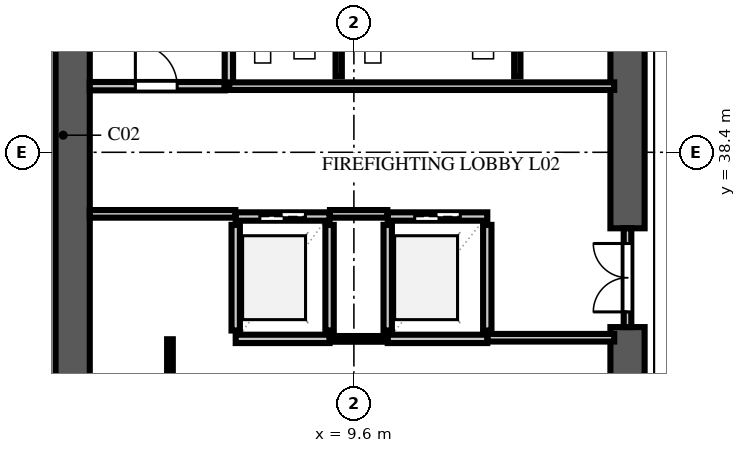
"""IFC4 building model, lengths in metres.
Left out: names, types, materials, properties, quantities, classifications, styles, units other than length and angle.
Written with IfcOpenShell. Run it as: python <this file> out.ifc"""

import sys

from ifc_helpers import new_model, si_unit, direction, frame, frame_2d, origin, place, context, subcontext, project, spatial, rectangle, extrude, element, fill, save


model = new_model("IFC4")
c1 = context("Model", 3, precision=1e-05, world=origin(), true_north=direction((0.0, 1.0)))
c2 = subcontext(c1, "Body", "Model", "MODEL_VIEW")
j1 = project(units=[si_unit("LENGTHUNIT", "METRE"), si_unit("PLANEANGLEUNIT", "RADIAN")], contexts=[c1])
p1 = place(None, origin())
s1 = spatial("IfcSite", under=j1, at=p1, CompositionType="ELEMENT")
p2 = place(p1, origin())
s2 = spatial("IfcBuilding", under=s1, at=p2, CompositionType="ELEMENT")
p3 = place(p2, frame((0.0, 0.0, 10.4)))
s3 = spatial("IfcBuildingStorey", under=s2, at=p3, CompositionType="ELEMENT", Elevation=10.4)
p4 = place(p3, frame((2.2, 9.15, 0.0), z_axis=(0.0, 0.0, 1.0), x_axis=(0.0, 1.0, 0.0)))
e1 = element("IfcWall", 1, at=p4, inside=s3, PredefinedType="SHEAR", context=c2, shape_type="SweptSolid", body=[
    extrude(rectangle(XDim=39.3, YDim=0.9, at=frame_2d((19.65, 0.0))), origin(), (0.0, 0.0, 1.0), 4.26),
])
p5 = place(p3, frame((16.8, 26.0, 0.0), z_axis=(0.0, 0.0, 1.0), x_axis=(0.0, 1.0, 0.0)))
e2 = element("IfcWall", 2, at=p5, inside=s3, PredefinedType="SHEAR", context=c2, shape_type="SweptSolid", body=[
    extrude(rectangle(XDim=7.8, YDim=0.9, at=frame_2d((3.9, 0.0))), origin(), (0.0, 0.0, 1.0), 4.26),
])
p6 = place(p3, frame((16.8, 36.4, 0.0), z_axis=(0.0, 0.0, 1.0), x_axis=(0.0, 1.0, 0.0)))
e3 = element("IfcWall", 3, at=p6, inside=s3, PredefinedType="SHEAR", context=c2, shape_type="SweptSolid", body=[
    extrude(rectangle(XDim=11.15, YDim=0.9, at=frame_2d((5.575, 0.0))), origin(), (0.0, 0.0, 1.0), 4.26),
])
p7 = place(p6, frame((9.2, 0.0, 0.0)))
e4 = element("IfcOpeningElement", 4, at=p7, cuts=e3, PredefinedType="OPENING", context=c2, shape_type="SweptSolid", body=[
    extrude(rectangle(XDim=0.95, YDim=2.15, at=frame_2d((0.475, 1.075))), frame((0.0, 0.462, 0.0), z_axis=(0.0, -1.0, 0.0), x_axis=(1.0, 0.0, 0.0)), (0.0, 0.0, 1.0), 0.924),
])
p8 = place(p3, frame((2.65, 40.14, 0.0), z_axis=(0.0, 0.0, 1.0), x_axis=(1.0, 0.0, 0.0)))
e5 = element("IfcWall", 5, at=p8, inside=s3, PredefinedType="SOLIDWALL", context=c2, shape_type="SweptSolid", body=[
    extrude(rectangle(XDim=3.55, YDim=0.22, at=frame_2d((1.775, 0.0))), origin(), (0.0, 0.0, 1.0), 4.26),
])
p9 = place(p8, frame((1.2, 0.0, 0.0)))
e6 = element("IfcOpeningElement", 6, at=p9, cuts=e5, PredefinedType="OPENING", context=c2, shape_type="SweptSolid", body=[
    extrude(rectangle(XDim=1.1, YDim=2.2, at=frame_2d((0.55, 1.1))), frame((0.0, 0.122, 0.0), z_axis=(0.0, -1.0, 0.0), x_axis=(1.0, 0.0, 0.0)), (0.0, 0.0, 1.0), 0.244),
])
p10 = place(p3, frame((6.31, 40.14, 0.0), z_axis=(0.0, 0.0, 1.0), x_axis=(0.0, 1.0, 0.0)))
e7 = element("IfcWall", 7, at=p10, inside=s3, PredefinedType="SOLIDWALL", context=c2, shape_type="SweptSolid", body=[
    extrude(rectangle(XDim=7.81, YDim=0.22, at=frame_2d((3.905, 0.0))), origin(), (0.0, 0.0, 1.0), 4.26),
])
for number, where, z_axis, x_axis in (
    (8, (6.49, 33.71, 0.0), (0.0, 0.0, 1.0), (0.0, 1.0, 0.0)),
    (9, (8.96, 33.71, 0.0), (0.0, 0.0, 1.0), (0.0, 1.0, 0.0)),
):
    element("IfcWall", number, at=place(p3, frame(where, z_axis=z_axis, x_axis=x_axis)), inside=s3, PredefinedType="SOLIDWALL", context=c2, shape_type="SweptSolid", body=[
        extrude(rectangle(XDim=2.78, YDim=0.22, at=frame_2d((1.39, 0.0))), origin(), (0.0, 0.0, 1.0), 4.26),
    ])
p11 = place(p3, frame((6.49, 33.49, 0.0), z_axis=(0.0, 0.0, 1.0), x_axis=(1.0, 0.0, 0.0)))
e10 = element("IfcWall", 10, at=p11, inside=s3, PredefinedType="SOLIDWALL", context=c2, shape_type="SweptSolid", body=[
    extrude(rectangle(XDim=2.47, YDim=0.22, at=frame_2d((1.235, 0.0))), origin(), (0.0, 0.0, 1.0), 4.26),
])
p12 = place(p3, frame((6.49, 36.71, 0.0), z_axis=(0.0, 0.0, 1.0), x_axis=(1.0, 0.0, 0.0)))
e11 = element("IfcWall", 11, at=p12, inside=s3, PredefinedType="SOLIDWALL", context=c2, shape_type="SweptSolid", body=[
    extrude(rectangle(XDim=2.47, YDim=0.22, at=frame_2d((1.235, 0.0))), origin(), (0.0, 0.0, 1.0), 4.26),
])
p13 = place(p12, frame((0.635, 0.0, 0.0)))
e12 = element("IfcOpeningElement", 12, at=p13, cuts=e11, PredefinedType="OPENING", context=c2, shape_type="SweptSolid", body=[
    extrude(rectangle(XDim=1.2, YDim=2.2, at=frame_2d((0.6, 1.1))), frame((0.0, 0.122, 0.0), z_axis=(0.0, -1.0, 0.0), x_axis=(1.0, 0.0, 0.0)), (0.0, 0.0, 1.0), 0.244),
])
for number, where, z_axis, x_axis in (
    (13, (10.49, 33.71, 0.0), (0.0, 0.0, 1.0), (0.0, 1.0, 0.0)),
    (14, (13.11, 33.71, 0.0), (0.0, 0.0, 1.0), (0.0, 1.0, 0.0)),
):
    element("IfcWall", number, at=place(p3, frame(where, z_axis=z_axis, x_axis=x_axis)), inside=s3, PredefinedType="SOLIDWALL", context=c2, shape_type="SweptSolid", body=[
        extrude(rectangle(XDim=2.78, YDim=0.22, at=frame_2d((1.39, 0.0))), origin(), (0.0, 0.0, 1.0), 4.26),
    ])
p14 = place(p3, frame((10.49, 33.49, 0.0), z_axis=(0.0, 0.0, 1.0), x_axis=(1.0, 0.0, 0.0)))
e15 = element("IfcWall", 15, at=p14, inside=s3, PredefinedType="SOLIDWALL", context=c2, shape_type="SweptSolid", body=[
    extrude(rectangle(XDim=2.62, YDim=0.22, at=frame_2d((1.31, 0.0))), origin(), (0.0, 0.0, 1.0), 4.26),
])
p15 = place(p3, frame((10.49, 36.71, 0.0), z_axis=(0.0, 0.0, 1.0), x_axis=(1.0, 0.0, 0.0)))
e16 = element("IfcWall", 16, at=p15, inside=s3, PredefinedType="SOLIDWALL", context=c2, shape_type="SweptSolid", body=[
    extrude(rectangle(XDim=2.62, YDim=0.22, at=frame_2d((1.31, 0.0))), origin(), (0.0, 0.0, 1.0), 4.26),
])
p16 = place(p15, frame((0.71, 0.0, 0.0)))
e17 = element("IfcOpeningElement", 17, at=p16, cuts=e16, PredefinedType="OPENING", context=c2, shape_type="SweptSolid", body=[
    extrude(rectangle(XDim=1.2, YDim=2.2, at=frame_2d((0.6, 1.1))), frame((0.0, 0.122, 0.0), z_axis=(0.0, -1.0, 0.0), x_axis=(1.0, 0.0, 0.0)), (0.0, 0.0, 1.0), 0.244),
])
p17 = place(p3, frame((2.65, 36.78, 0.0), z_axis=(0.0, 0.0, 1.0), x_axis=(1.0, 0.0, 0.0)))
e18 = element("IfcWall", 18, at=p17, inside=s3, PredefinedType="SOLIDWALL", context=c2, shape_type="SweptSolid", body=[
    extrude(rectangle(XDim=3.83, YDim=0.2, at=frame_2d((1.915, 0.0))), origin(), (0.0, 0.0, 1.0), 4.26),
])
p18 = place(p3, frame((8.97, 36.78, 0.0), z_axis=(0.0, 0.0, 1.0), x_axis=(1.0, 0.0, 0.0)))
e19 = element("IfcWall", 19, at=p18, inside=s3, PredefinedType="SOLIDWALL", context=c2, shape_type="SweptSolid", body=[
    extrude(rectangle(XDim=1.51, YDim=0.2, at=frame_2d((0.755, 0.0))), origin(), (0.0, 0.0, 1.0), 4.26),
])
p19 = place(p3, frame((13.12, 33.52, 0.0), z_axis=(0.0, 0.0, 1.0), x_axis=(1.0, 0.0, 0.0)))
e20 = element("IfcWall", 20, at=p19, inside=s3, PredefinedType="SOLIDWALL", context=c2, shape_type="SweptSolid", body=[
    extrude(rectangle(XDim=3.33, YDim=0.2, at=frame_2d((1.665, 0.0))), origin(), (0.0, 0.0, 1.0), 4.26),
])
p20 = place(p3, frame((6.32, 40.14, 0.0), z_axis=(0.0, 0.0, 1.0), x_axis=(1.0, 0.0, 0.0)))
e21 = element("IfcWall", 21, at=p20, inside=s3, PredefinedType="SOLIDWALL", context=c2, shape_type="SweptSolid", body=[
    extrude(rectangle(XDim=10.13, YDim=0.2, at=frame_2d((5.065, 0.0))), origin(), (0.0, 0.0, 1.0), 4.26),
])
p21 = place(p3, frame((16.8, 33.8, 0.0), z_axis=(0.0, 0.0, 1.0), x_axis=(0.0, 1.0, 0.0)))
e22 = element("IfcWall", 22, at=p21, inside=s3, PredefinedType="SOLIDWALL", context=c2, shape_type="SweptSolid", body=[
    extrude(rectangle(XDim=2.6, YDim=0.2, at=frame_2d((1.3, 0.0))), origin(), (0.0, 0.0, 1.0), 4.26),
])
p22 = place(p21, frame((0.4, 0.0, 0.0)))
e23 = element("IfcOpeningElement", 23, at=p22, cuts=e22, PredefinedType="OPENING", context=c2, shape_type="SweptSolid", body=[
    extrude(rectangle(XDim=1.8, YDim=2.2, at=frame_2d((0.9, 1.1))), frame((0.0, 0.112, 0.0), z_axis=(0.0, -1.0, 0.0), x_axis=(1.0, 0.0, 0.0)), (0.0, 0.0, 1.0), 0.224),
])
p23 = place(p3, frame((8.965, 33.49, 0.0), z_axis=(0.0, 0.0, 1.0), x_axis=(1.0, 0.0, 0.0)))
e24 = element("IfcWall", 24, at=p23, inside=s3, PredefinedType="PARTITIONING", context=c2, shape_type="SweptSolid", body=[
    extrude(rectangle(XDim=1.52, YDim=0.15, at=frame_2d((0.76, 0.0))), origin(), (0.0, 0.0, 1.0), 4.26),
])
p24 = place(p3, frame((4.76, 30.55, 0.0), z_axis=(0.0, 0.0, 1.0), x_axis=(0.0, 1.0, 0.0)))
e25 = element("IfcWall", 25, at=p24, inside=s3, PredefinedType="PARTITIONING", context=c2, shape_type="SweptSolid", body=[
    extrude(rectangle(XDim=2.93, YDim=0.15, at=frame_2d((1.465, 0.0))), origin(), (0.0, 0.0, 1.0), 4.26),
])
p25 = place(p24, frame((0.6, 0.0, 0.0)))
e26 = element("IfcOpeningElement", 26, at=p25, cuts=e25, PredefinedType="OPENING", context=c2, shape_type="SweptSolid", body=[
    extrude(rectangle(XDim=0.85, YDim=2.1, at=frame_2d((0.425, 1.05))), frame((0.0, 0.087, 0.0), z_axis=(0.0, -1.0, 0.0), x_axis=(1.0, 0.0, 0.0)), (0.0, 0.0, 1.0), 0.174),
])
for number, where, z_axis, x_axis in (
    (27, (9.2, 40.4, 0.0), (0.0, 0.0, 1.0), (0.0, 1.0, 0.0)),
    (28, (13.9, 40.4, 0.0), (0.0, 0.0, 1.0), (0.0, 1.0, 0.0)),
):
    element("IfcWall", number, at=place(p3, frame(where, z_axis=z_axis, x_axis=x_axis)), inside=s3, PredefinedType="PLUMBINGWALL", context=c2, shape_type="SweptSolid", body=[
        extrude(rectangle(XDim=4.92, YDim=0.165, at=frame_2d((2.46, 0.0))), origin(), (0.0, 0.0, 1.0), 4.26),
    ])
p26 = place(p9, origin())
e29 = element("IfcDoor", 29, at=p26, inside=s3, OperationType="SINGLE_SWING_LEFT", PredefinedType="DOOR", context=c2, shape_type="SweptSolid", body=[
    extrude(rectangle(XDim=1.1, YDim=2.2, at=frame_2d((0.55, 1.1))), frame((0.0, 0.025, 0.0), z_axis=(0.0, -1.0, 0.0), x_axis=(1.0, 0.0, 0.0)), (0.0, 0.0, 1.0), 0.05),
])
fill(e6, e29)
p27 = place(p13, origin())
e30 = element("IfcDoor", 30, at=p27, inside=s3, OperationType="DOUBLE_DOOR_SLIDING", PredefinedType="DOOR", context=c2, shape_type="SweptSolid", body=[
    extrude(rectangle(XDim=1.2, YDim=2.2, at=frame_2d((0.6, 1.1))), frame((0.0, 0.025, 0.0), z_axis=(0.0, -1.0, 0.0), x_axis=(1.0, 0.0, 0.0)), (0.0, 0.0, 1.0), 0.05),
])
fill(e12, e30)
p28 = place(p16, origin())
e31 = element("IfcDoor", 31, at=p28, inside=s3, OperationType="DOUBLE_DOOR_SLIDING", PredefinedType="DOOR", context=c2, shape_type="SweptSolid", body=[
    extrude(rectangle(XDim=1.2, YDim=2.2, at=frame_2d((0.6, 1.1))), frame((0.0, 0.025, 0.0), z_axis=(0.0, -1.0, 0.0), x_axis=(1.0, 0.0, 0.0)), (0.0, 0.0, 1.0), 0.05),
])
fill(e17, e31)
p29 = place(p22, origin())
e32 = element("IfcDoor", 32, at=p29, inside=s3, OperationType="DOUBLE_DOOR_SINGLE_SWING", PredefinedType="DOOR", context=c2, shape_type="SweptSolid", body=[
    extrude(rectangle(XDim=1.8, YDim=2.2, at=frame_2d((0.9, 1.1))), frame((0.0, 0.025, 0.0), z_axis=(0.0, -1.0, 0.0), x_axis=(1.0, 0.0, 0.0)), (0.0, 0.0, 1.0), 0.05),
])
fill(e23, e32)
save(model, sys.argv[1])
